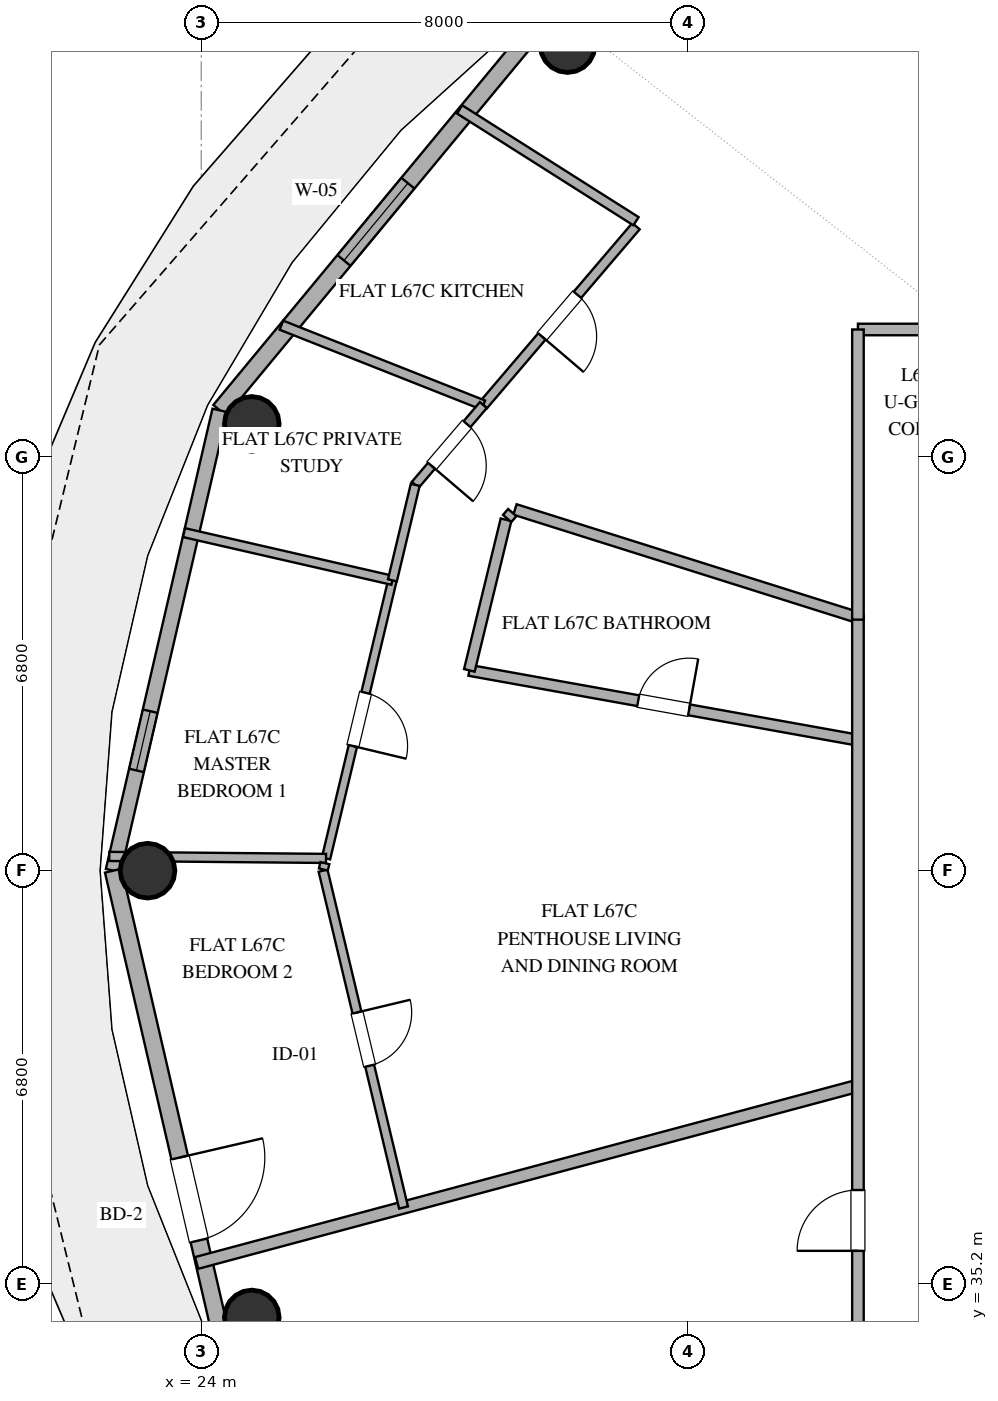
"""IFC4 building model, lengths in metres.
Left out: names, types, materials, properties, quantities, classifications, styles, units other than length and angle.
Written with IfcOpenShell. Run it as: python <this file> out.ifc"""

import sys

from ifc_helpers import new_model, si_unit, direction, frame, frame_2d, origin, origin_2d, place, context, subcontext, project, spatial, rectangle, hollow_circle, extrude, element, fill, save


model = new_model("IFC4")
c1 = context("Model", 3, precision=1e-05, world=origin(), true_north=direction((0.0, 1.0)))
c2 = subcontext(c1, "Body", "Model", "MODEL_VIEW")
j1 = project(units=[si_unit("LENGTHUNIT", "METRE"), si_unit("PLANEANGLEUNIT", "RADIAN")], contexts=[c1])
p1 = place(None, origin())
s1 = spatial("IfcSite", under=j1, at=p1, CompositionType="ELEMENT")
p2 = place(p1, origin())
s2 = spatial("IfcBuilding", under=s1, at=p2, CompositionType="ELEMENT")
p3 = place(p2, frame((0.0, 0.0, 262.2)))
s3 = spatial("IfcBuildingStorey", under=s2, at=p3, CompositionType="ELEMENT", Elevation=262.2)
for number, where, z_axis, x_axis in (
    (1, (30.025, 55.576, 0.0), (0.0, 0.0, 1.0), (1.0, 0.0, 0.0)),
    (2, (24.831, 49.347, 0.0), (0.0, 0.0, 1.0), (1.0, 0.0, 0.0)),
    (3, (23.117, 42.0, 0.0), (0.0, 0.0, 1.0), (1.0, 0.0, 0.0)),
    (4, (24.831, 34.653, 0.0), (0.0, 0.0, 1.0), (1.0, 0.0, 0.0)),
):
    element("IfcColumn", number, at=place(p3, frame(where, z_axis=z_axis, x_axis=x_axis)), inside=s3, PredefinedType="COLUMN", context=c2, shape_type="SweptSolid", body=[
        extrude(hollow_circle(Radius=0.45, WallThickness=0.025, at=origin_2d()), origin(), (0.0, 0.0, 1.0), 3.37),
    ])
p4 = place(p3, frame((29.617, 55.987, 0.0), z_axis=(0.0, 0.0, 1.0), x_axis=(-0.63761509934, -0.770355103243, 0.0)))
e5 = element("IfcWall", 5, at=p4, inside=s3, PredefinedType="SOLIDWALL", context=c2, shape_type="SweptSolid", body=[
    extrude(rectangle(XDim=8.33, YDim=0.28, at=frame_2d((4.165, 0.0))), origin(), (0.0, 0.0, 1.0), 3.37),
])
p5 = place(p4, frame((3.479, 0.0, 0.85)))
e6 = element("IfcOpeningElement", 6, at=p5, cuts=e5, PredefinedType="OPENING", context=c2, shape_type="SweptSolid", body=[
    extrude(rectangle(XDim=1.65, YDim=2.0, at=frame_2d((0.825, 1.0))), frame((0.0, 0.15, 0.0), z_axis=(0.0, -1.0, 0.0), x_axis=(1.0, 0.0, 0.0)), (0.0, 0.0, 1.0), 0.3),
])
p6 = place(p3, frame((24.306, 49.57, 0.0), z_axis=(0.0, 0.0, 1.0), x_axis=(-0.225635078214, -0.974211892495, 0.0)))
e7 = element("IfcWall", 7, at=p6, inside=s3, PredefinedType="SOLIDWALL", context=c2, shape_type="SweptSolid", body=[
    extrude(rectangle(XDim=7.77, YDim=0.25, at=frame_2d((3.885, 0.0))), origin(), (0.0, 0.0, 1.0), 3.37),
])
p7 = place(p6, frame((5.078, 0.0, 1.42)))
e8 = element("IfcOpeningElement", 8, at=p7, cuts=e7, PredefinedType="OPENING", context=c2, shape_type="SweptSolid", body=[
    extrude(rectangle(XDim=1.0, YDim=1.05, at=frame_2d((0.5, 0.525))), frame((0.0, 0.135, 0.0), z_axis=(0.0, -1.0, 0.0), x_axis=(1.0, 0.0, 0.0)), (0.0, 0.0, 1.0), 0.27),
])
p8 = place(p3, frame((22.553, 42.0, 0.0), z_axis=(0.0, 0.0, 1.0), x_axis=(0.225635078214, -0.974211892495, 0.0)))
e9 = element("IfcWall", 9, at=p8, inside=s3, PredefinedType="SOLIDWALL", context=c2, shape_type="SweptSolid", body=[
    extrude(rectangle(XDim=7.77, YDim=0.28, at=frame_2d((3.885, 0.0))), origin(), (0.0, 0.0, 1.0), 3.37),
])
p9 = place(p8, frame((4.842, 0.0, 0.0)))
e10 = element("IfcOpeningElement", 10, at=p9, cuts=e9, PredefinedType="OPENING", context=c2, shape_type="SweptSolid", body=[
    extrude(rectangle(XDim=1.4, YDim=2.2, at=frame_2d((0.7, 1.1))), frame((0.0, 0.15, 0.0), z_axis=(0.0, -1.0, 0.0), x_axis=(1.0, 0.0, 0.0)), (0.0, 0.0, 1.0), 0.3),
])
p10 = place(p3, frame((34.8, 50.9, 0.0), z_axis=(0.0, 0.0, 1.0), x_axis=(1.0, 0.0, 0.0)))
e11 = element("IfcWall", 11, at=p10, inside=s3, PredefinedType="PARTITIONING", context=c2, shape_type="SweptSolid", body=[
    extrude(rectangle(XDim=16.473, YDim=0.19, at=frame_2d((8.237, 0.0))), origin(), (0.0, 0.0, 1.0), 2.73),
])
p11 = place(p10, frame((10.196, 0.0, 0.0)))
e12 = element("IfcOpeningElement", 12, at=p11, cuts=e11, PredefinedType="OPENING", context=c2, shape_type="SweptSolid", body=[
    extrude(rectangle(XDim=1.0, YDim=2.2, at=frame_2d((0.5, 1.1))), frame((0.0, 0.105, 0.0), z_axis=(0.0, -1.0, 0.0), x_axis=(1.0, 0.0, 0.0)), (0.0, 0.0, 1.0), 0.21),
])
p12 = place(p10, frame((2.387, 0.0, 0.0)))
e13 = element("IfcOpeningElement", 13, at=p12, cuts=e11, PredefinedType="OPENING", context=c2, shape_type="SweptSolid", body=[
    extrude(rectangle(XDim=1.0, YDim=2.2, at=frame_2d((0.5, 1.1))), frame((0.0, 0.105, 0.0), z_axis=(0.0, -1.0, 0.0), x_axis=(1.0, 0.0, 0.0)), (0.0, 0.0, 1.0), 0.21),
])
p13 = place(p3, frame((23.924, 35.549, 0.0), z_axis=(0.0, 0.0, 1.0), x_axis=(0.965923661364, 0.258827124578, 0.0)))
e14 = element("IfcWall", 14, at=p13, inside=s3, PredefinedType="PARTITIONING", context=c2, shape_type="SweptSolid", body=[
    extrude(rectangle(XDim=11.26, YDim=0.2, at=frame_2d((5.63, 0.0))), origin(), (0.0, 0.0, 1.0), 2.73),
])
p14 = place(p3, frame((28.409, 45.294, 0.0), z_axis=(0.0, 0.0, 1.0), x_axis=(0.984253263435, -0.176764004867, 0.0)))
e15 = element("IfcWall", 15, at=p14, inside=s3, PredefinedType="PLUMBINGWALL", context=c2, shape_type="SweptSolid", body=[
    extrude(rectangle(XDim=6.493, YDim=0.18, at=frame_2d((3.247, 0.0))), origin(), (0.0, 0.0, 1.0), 2.73),
])
p15 = place(p14, frame((2.821, 0.0, 0.0)))
e16 = element("IfcOpeningElement", 16, at=p15, cuts=e15, PredefinedType="OPENING", context=c2, shape_type="SweptSolid", body=[
    extrude(rectangle(XDim=0.85, YDim=2.1, at=frame_2d((0.425, 1.05))), frame((0.0, 0.1, 0.0), z_axis=(0.0, -1.0, 0.0), x_axis=(1.0, 0.0, 0.0)), (0.0, 0.0, 1.0), 0.2),
])
p16 = place(p3, frame((40.532, 50.9, 0.0), z_axis=(0.0, 0.0, 1.0), x_axis=(-0.642777155779, 0.766053214868, 0.0)))
e17 = element("IfcWall", 17, at=p16, inside=s3, PredefinedType="PARTITIONING", context=c2, shape_type="SweptSolid", body=[
    extrude(rectangle(XDim=9.868, YDim=0.2, at=frame_2d((4.934, 0.0))), origin(), (0.0, 0.0, 1.0), 2.73),
])
p17 = place(p3, frame((34.8, 46.162, 0.0), z_axis=(0.0, 0.0, 1.0), x_axis=(-0.953717336958, 0.3007045746, 0.0)))
e18 = element("IfcWall", 18, at=p17, inside=s3, PredefinedType="PLUMBINGWALL", context=c2, shape_type="SweptSolid", body=[
    extrude(rectangle(XDim=5.914, YDim=0.18, at=frame_2d((2.957, 0.0))), origin(), (0.0, 0.0, 1.0), 2.73),
])
p18 = place(p3, frame((34.8, 34.0, 0.0), z_axis=(0.0, 0.0, 1.0), x_axis=(0.0, 1.0, 0.0)))
e19 = element("IfcWall", 19, at=p18, inside=s3, PredefinedType="PARTITIONING", context=c2, shape_type="SweptSolid", body=[
    extrude(rectangle(XDim=12.196, YDim=0.19, at=frame_2d((6.098, 0.0))), origin(), (0.0, 0.0, 1.0), 2.73),
])
p19 = place(p18, frame((1.748, 0.0, 0.0)))
e20 = element("IfcOpeningElement", 20, at=p19, cuts=e19, PredefinedType="OPENING", context=c2, shape_type="SweptSolid", body=[
    extrude(rectangle(XDim=1.0, YDim=2.2, at=frame_2d((0.5, 1.1))), frame((0.0, 0.105, 0.0), z_axis=(0.0, -1.0, 0.0), x_axis=(1.0, 0.0, 0.0)), (0.0, 0.0, 1.0), 0.21),
])
p20 = place(p3, frame((26.004, 42.0, 0.0), z_axis=(0.0, 0.0, 1.0), x_axis=(0.232304342064, -0.972643147644, 0.0)))
e21 = element("IfcWall", 21, at=p20, inside=s3, PredefinedType="PARTITIONING", context=c2, shape_type="SweptSolid", body=[
    extrude(rectangle(XDim=5.695, YDim=0.15, at=frame_2d((2.848, 0.0))), origin(), (0.0, 0.0, 1.0), 2.73),
])
p21 = place(p20, frame((2.398, 0.0, 0.0)))
e22 = element("IfcOpeningElement", 22, at=p21, cuts=e21, PredefinedType="OPENING", context=c2, shape_type="SweptSolid", body=[
    extrude(rectangle(XDim=0.9, YDim=2.1, at=frame_2d((0.45, 1.05))), frame((0.0, 0.085, 0.0), z_axis=(0.0, -1.0, 0.0), x_axis=(1.0, 0.0, 0.0)), (0.0, 0.0, 1.0), 0.17),
])
p22 = place(p3, frame((34.8, 46.128, 0.0), z_axis=(0.0, 0.0, 1.0), x_axis=(0.0, 1.0, 0.0)))
e23 = element("IfcWall", 23, at=p22, inside=s3, PredefinedType="PARTITIONING", context=c2, shape_type="SweptSolid", body=[
    extrude(rectangle(XDim=4.771, YDim=0.19, at=frame_2d((2.386, 0.0))), origin(), (0.0, 0.0, 1.0), 2.73),
])
p23 = place(p3, frame((27.144, 46.775, 0.0), z_axis=(0.0, 0.0, 1.0), x_axis=(-0.232320140936, -0.972639374134, 0.0)))
e24 = element("IfcWall", 24, at=p23, inside=s3, PredefinedType="PARTITIONING", context=c2, shape_type="SweptSolid", body=[
    extrude(rectangle(XDim=4.702, YDim=0.14, at=frame_2d((2.351, 0.0))), origin(), (0.0, 0.0, 1.0), 2.73),
])
p24 = place(p23, frame((1.901, 0.0, 0.0)))
e25 = element("IfcOpeningElement", 25, at=p24, cuts=e24, PredefinedType="OPENING", context=c2, shape_type="SweptSolid", body=[
    extrude(rectangle(XDim=0.9, YDim=2.1, at=frame_2d((0.45, 1.05))), frame((0.0, 0.08, 0.0), z_axis=(0.0, -1.0, 0.0), x_axis=(1.0, 0.0, 0.0)), (0.0, 0.0, 1.0), 0.16),
])
p25 = place(p3, frame((31.15, 52.599, 0.0), z_axis=(0.0, 0.0, 1.0), x_axis=(-0.649199141965, -0.760618481285, 0.0)))
e26 = element("IfcWall", 26, at=p25, inside=s3, PredefinedType="PLUMBINGWALL", context=c2, shape_type="SweptSolid", body=[
    extrude(rectangle(XDim=3.867, YDim=0.16, at=frame_2d((1.934, 0.0))), origin(), (0.0, 0.0, 1.0), 2.73),
])
p26 = place(p25, frame((1.484, 0.0, 0.0)))
e27 = element("IfcOpeningElement", 27, at=p26, cuts=e26, PredefinedType="OPENING", context=c2, shape_type="SweptSolid", body=[
    extrude(rectangle(XDim=0.9, YDim=2.1, at=frame_2d((0.45, 1.05))), frame((0.0, 0.09, 0.0), z_axis=(0.0, -1.0, 0.0), x_axis=(1.0, 0.0, 0.0)), (0.0, 0.0, 1.0), 0.18),
])
p27 = place(p3, frame((25.318, 50.971, 0.0), z_axis=(0.0, 0.0, 1.0), x_axis=(0.929912335167, -0.36778125143, 0.0)))
e28 = element("IfcWall", 28, at=p27, inside=s3, PredefinedType="PLUMBINGWALL", context=c2, shape_type="SweptSolid", body=[
    extrude(rectangle(XDim=3.571, YDim=0.16, at=frame_2d((1.786, 0.0))), origin(), (0.0, 0.0, 1.0), 2.73),
])
p28 = place(p3, frame((22.487, 42.234, 0.0), z_axis=(0.0, 0.0, 1.0), x_axis=(0.999957889833, -0.009177067135, 0.0)))
e29 = element("IfcWall", 29, at=p28, inside=s3, PredefinedType="PARTITIONING", context=c2, shape_type="SweptSolid", body=[
    extrude(rectangle(XDim=3.565, YDim=0.15, at=frame_2d((1.782, 0.0))), origin(), (0.0, 0.0, 1.0), 2.73),
])
p29 = place(p3, frame((23.717, 47.559, 0.0), z_axis=(0.0, 0.0, 1.0), x_axis=(0.974786474408, -0.223139708056, 0.0)))
e30 = element("IfcWall", 30, at=p29, inside=s3, PredefinedType="PARTITIONING", context=c2, shape_type="SweptSolid", body=[
    extrude(rectangle(XDim=3.515, YDim=0.15, at=frame_2d((1.758, 0.0))), origin(), (0.0, 0.0, 1.0), 2.73),
])
p30 = place(p3, frame((28.249, 54.519, 0.0), z_axis=(0.0, 0.0, 1.0), x_axis=(0.844643402302, -0.535329359318, 0.0)))
e31 = element("IfcWall", 31, at=p30, inside=s3, PredefinedType="PLUMBINGWALL", context=c2, shape_type="SweptSolid", body=[
    extrude(rectangle(XDim=3.435, YDim=0.16, at=frame_2d((1.718, 0.0))), origin(), (0.0, 0.0, 1.0), 2.73),
])
p31 = place(p3, frame((29.012, 47.771, 0.0), z_axis=(0.0, 0.0, 1.0), x_axis=(-0.236537291112, -0.971622411183, 0.0)))
e32 = element("IfcWall", 32, at=p31, inside=s3, PredefinedType="PLUMBINGWALL", context=c2, shape_type="SweptSolid", body=[
    extrude(rectangle(XDim=2.549, YDim=0.18, at=frame_2d((1.275, 0.0))), origin(), (0.0, 0.0, 1.0), 2.73),
])
p32 = place(p3, frame((28.639, 49.657, 0.0), z_axis=(0.0, 0.0, 1.0), x_axis=(-0.649228439324, -0.760593474579, 0.0)))
e33 = element("IfcWall", 33, at=p32, inside=s3, PredefinedType="PARTITIONING", context=c2, shape_type="SweptSolid", body=[
    extrude(rectangle(XDim=1.725, YDim=0.15, at=frame_2d((0.863, 0.0))), origin(), (0.0, 0.0, 1.0), 2.73),
])
p33 = place(p32, frame((0.413, 0.0, 0.0)))
e34 = element("IfcOpeningElement", 34, at=p33, cuts=e33, PredefinedType="OPENING", context=c2, shape_type="SweptSolid", body=[
    extrude(rectangle(XDim=0.9, YDim=2.1, at=frame_2d((0.45, 1.05))), frame((0.0, 0.085, 0.0), z_axis=(0.0, -1.0, 0.0), x_axis=(1.0, 0.0, 0.0)), (0.0, 0.0, 1.0), 0.17),
])
p34 = place(p3, frame((27.519, 48.345, 0.0), z_axis=(0.0, 0.0, 1.0), x_axis=(-0.232274682056, -0.972650231109, 0.0)))
e35 = element("IfcWall", 35, at=p34, inside=s3, PredefinedType="PARTITIONING", context=c2, shape_type="SweptSolid", body=[
    extrude(rectangle(XDim=1.615, YDim=0.15, at=frame_2d((0.807, 0.0))), origin(), (0.0, 0.0, 1.0), 2.73),
])
p35 = place(p3, frame((29.115, 47.889, 0.0), z_axis=(0.0, 0.0, 1.0), x_axis=(-0.657024535632, -0.753869192618, 0.0)))
e36 = element("IfcWall", 36, at=p35, inside=s3, PredefinedType="PLUMBINGWALL", context=c2, shape_type="SweptSolid", body=[
    extrude(rectangle(XDim=0.129, YDim=0.18, at=frame_2d((0.064, 0.0))), origin(), (0.0, 0.0, 1.0), 2.73),
])
p36 = place(p3, frame((26.033, 42.124, 0.0), z_axis=(0.0, 0.0, 1.0), x_axis=(-0.232339008139, -0.972634867407, 0.0)))
e37 = element("IfcWall", 37, at=p36, inside=s3, PredefinedType="PARTITIONING", context=c2, shape_type="SweptSolid", body=[
    extrude(rectangle(XDim=0.107, YDim=0.15, at=frame_2d((0.054, 0.0))), origin(), (0.0, 0.0, 1.0), 2.73),
])
p37 = place(p5, origin())
e38 = element("IfcWindow", 38, at=p37, inside=s3, PartitioningType="SINGLE_PANEL", PredefinedType="WINDOW", context=c2, shape_type="SweptSolid", body=[
    extrude(rectangle(XDim=1.65, YDim=2.0, at=frame_2d((0.825, 1.0))), frame((0.0, 0.03, 0.0), z_axis=(0.0, -1.0, 0.0), x_axis=(1.0, 0.0, 0.0)), (0.0, 0.0, 1.0), 0.06),
])
fill(e6, e38)
p38 = place(p9, origin())
e39 = element("IfcDoor", 39, at=p38, inside=s3, OperationType="SINGLE_SWING_LEFT", PredefinedType="DOOR", context=c2, shape_type="SweptSolid", body=[
    extrude(rectangle(XDim=1.4, YDim=2.2, at=frame_2d((0.7, 1.1))), frame((0.0, 0.025, 0.0), z_axis=(0.0, -1.0, 0.0), x_axis=(1.0, 0.0, 0.0)), (0.0, 0.0, 1.0), 0.05),
])
fill(e10, e39)
p39 = place(p7, origin())
e40 = element("IfcWindow", 40, at=p39, inside=s3, PartitioningType="SINGLE_PANEL", PredefinedType="WINDOW", context=c2, shape_type="SweptSolid", body=[
    extrude(rectangle(XDim=1.0, YDim=1.05, at=frame_2d((0.5, 0.525))), frame((0.0, 0.03, 0.0), z_axis=(0.0, -1.0, 0.0), x_axis=(1.0, 0.0, 0.0)), (0.0, 0.0, 1.0), 0.06),
])
fill(e8, e40)
p40 = place(p15, origin())
e41 = element("IfcDoor", 41, at=p40, inside=s3, OperationType="SINGLE_SWING_RIGHT", PredefinedType="DOOR", context=c2, shape_type="SweptSolid", body=[
    extrude(rectangle(XDim=0.85, YDim=2.1, at=frame_2d((0.425, 1.05))), frame((0.0, 0.025, 0.0), z_axis=(0.0, -1.0, 0.0), x_axis=(1.0, 0.0, 0.0)), (0.0, 0.0, 1.0), 0.05),
])
fill(e16, e41)
p41 = place(p19, origin())
e42 = element("IfcDoor", 42, at=p41, inside=s3, OperationType="SINGLE_SWING_LEFT", PredefinedType="DOOR", context=c2, shape_type="SweptSolid", body=[
    extrude(rectangle(XDim=1.0, YDim=2.2, at=frame_2d((0.5, 1.1))), frame((0.0, 0.025, 0.0), z_axis=(0.0, -1.0, 0.0), x_axis=(1.0, 0.0, 0.0)), (0.0, 0.0, 1.0), 0.05),
])
fill(e20, e42)
p42 = place(p21, origin())
e43 = element("IfcDoor", 43, at=p42, inside=s3, OperationType="SINGLE_SWING_LEFT", PredefinedType="DOOR", context=c2, shape_type="SweptSolid", body=[
    extrude(rectangle(XDim=0.9, YDim=2.1, at=frame_2d((0.45, 1.05))), frame((0.0, 0.025, 0.0), z_axis=(0.0, -1.0, 0.0), x_axis=(1.0, 0.0, 0.0)), (0.0, 0.0, 1.0), 0.05),
])
fill(e22, e43)
p43 = place(p24, origin())
e44 = element("IfcDoor", 44, at=p43, inside=s3, OperationType="SINGLE_SWING_RIGHT", PredefinedType="DOOR", context=c2, shape_type="SweptSolid", body=[
    extrude(rectangle(XDim=0.9, YDim=2.1, at=frame_2d((0.45, 1.05))), frame((0.0, 0.025, 0.0), z_axis=(0.0, -1.0, 0.0), x_axis=(1.0, 0.0, 0.0)), (0.0, 0.0, 1.0), 0.05),
])
fill(e25, e44)
p44 = place(p26, origin())
e45 = element("IfcDoor", 45, at=p44, inside=s3, OperationType="SINGLE_SWING_RIGHT", PredefinedType="DOOR", context=c2, shape_type="SweptSolid", body=[
    extrude(rectangle(XDim=0.9, YDim=2.1, at=frame_2d((0.45, 1.05))), frame((0.0, 0.025, 0.0), z_axis=(0.0, -1.0, 0.0), x_axis=(1.0, 0.0, 0.0)), (0.0, 0.0, 1.0), 0.05),
])
fill(e27, e45)
p45 = place(p33, origin())
e46 = element("IfcDoor", 46, at=p45, inside=s3, OperationType="SINGLE_SWING_RIGHT", PredefinedType="DOOR", context=c2, shape_type="SweptSolid", body=[
    extrude(rectangle(XDim=0.9, YDim=2.1, at=frame_2d((0.45, 1.05))), frame((0.0, 0.025, 0.0), z_axis=(0.0, -1.0, 0.0), x_axis=(1.0, 0.0, 0.0)), (0.0, 0.0, 1.0), 0.05),
])
fill(e34, e46)
save(model, sys.argv[1])
